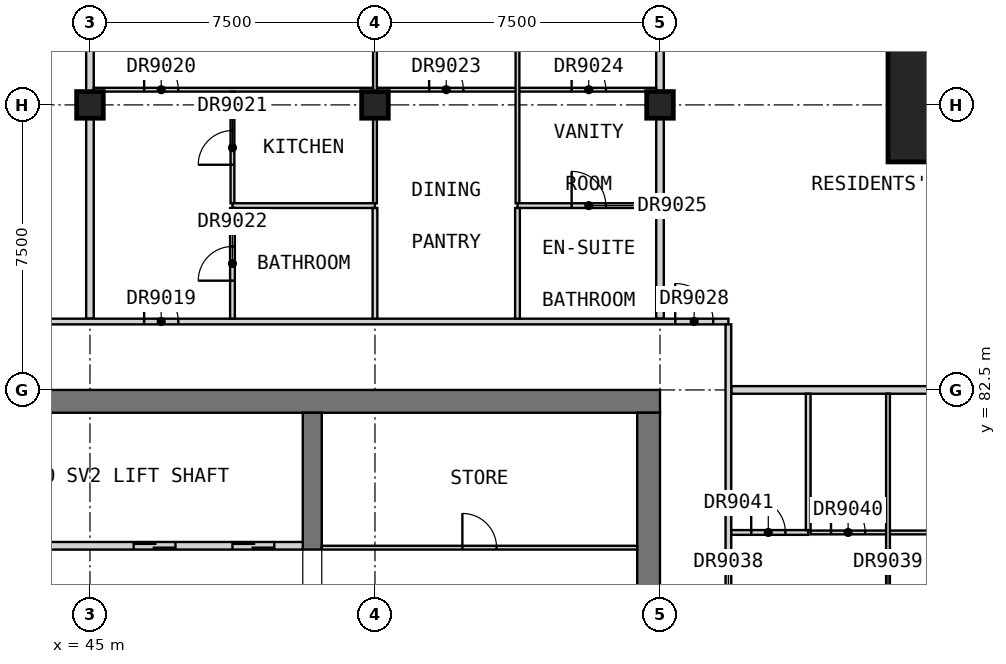
"""IFC4 building model, lengths in metres.
Left out: names, types, materials, properties, quantities, classifications, styles, units other than length and angle.
Written with IfcOpenShell. Run it as: python <this file> out.ifc"""

import sys

from ifc_helpers import new_model, si_unit, direction, frame, frame_2d, origin, origin_2d, place, context, subcontext, project, spatial, rectangle, extrude, element, fill, save


model = new_model("IFC4")
c1 = context("Model", 3, precision=1e-05, world=origin(), true_north=direction((0.0, 1.0)))
c2 = subcontext(c1, "Body", "Model", "MODEL_VIEW")
j1 = project(units=[si_unit("LENGTHUNIT", "METRE"), si_unit("PLANEANGLEUNIT", "RADIAN")], contexts=[c1])
p1 = place(None, origin())
s1 = spatial("IfcSite", under=j1, at=p1, CompositionType="ELEMENT")
p2 = place(p1, origin())
s2 = spatial("IfcBuilding", under=s1, at=p2, CompositionType="ELEMENT")
p3 = place(p2, frame((0.0, 0.0, 269.7)))
s3 = spatial("IfcBuildingStorey", under=s2, at=p3, CompositionType="ELEMENT", Elevation=269.7)
for number, where, z_axis, x_axis in (
    (1, (45.0, 90.0, 0.0), (0.0, 0.0, 1.0), (1.0, 0.0, 0.0)),
    (2, (52.5, 90.0, 0.0), (0.0, 0.0, 1.0), (1.0, 0.0, 0.0)),
    (3, (60.0, 90.0, 0.0), (0.0, 0.0, 1.0), (1.0, 0.0, 0.0)),
):
    element("IfcColumn", number, at=place(p3, frame(where, z_axis=z_axis, x_axis=x_axis)), inside=s3, PredefinedType="COLUMN", context=c2, shape_type="SweptSolid", body=[
        extrude(rectangle(XDim=0.7, YDim=0.7, at=origin_2d()), origin(), (0.0, 0.0, 1.0), 3.5),
    ])
p4 = place(p3, frame((67.5, 90.0, 0.0), z_axis=(0.0, 0.0, 1.0), x_axis=(1.0, 0.0, 0.0)))
e4 = element("IfcColumn", 4, at=p4, inside=s3, PredefinedType="COLUMN", context=c2, shape_type="SweptSolid", body=[
    extrude(rectangle(XDim=3.0, YDim=3.0, at=origin_2d()), origin(), (0.0, 0.0, 1.0), 3.5),
])
p5 = place(p3, frame((30.0, 82.2, 0.0), z_axis=(0.0, 0.0, 1.0), x_axis=(1.0, 0.0, 0.0)))
e5 = element("IfcWall", 5, at=p5, inside=s3, PredefinedType="SHEAR", context=c2, shape_type="SweptSolid", body=[
    extrude(rectangle(XDim=30.0, YDim=0.6, at=frame_2d((15.0, 0.0))), origin(), (0.0, 0.0, 1.0), 3.5),
])
p6 = place(p3, frame((59.7, 60.6, 0.0), z_axis=(0.0, 0.0, 1.0), x_axis=(0.0, 1.0, 0.0)))
e6 = element("IfcWall", 6, at=p6, inside=s3, PredefinedType="SHEAR", context=c2, shape_type="SweptSolid", body=[
    extrude(rectangle(XDim=21.3, YDim=0.6, at=frame_2d((10.65, 0.0))), origin(), (0.0, 0.0, 1.0), 3.5),
])
p7 = place(p6, frame((14.9, 0.0, 0.0)))
e7 = element("IfcOpeningElement", 7, at=p7, cuts=e6, PredefinedType="OPENING", context=c2, shape_type="SweptSolid", body=[
    extrude(rectangle(XDim=1.8, YDim=2.1, at=frame_2d((0.9, 1.05))), frame((0.0, 0.31, 0.0), z_axis=(0.0, -1.0, 0.0), x_axis=(1.0, 0.0, 0.0)), (0.0, 0.0, 1.0), 0.62),
])
p8 = place(p3, frame((50.85, 78.3, 0.0), z_axis=(0.0, 0.0, 1.0), x_axis=(0.0, 1.0, 0.0)))
e8 = element("IfcWall", 8, at=p8, inside=s3, PredefinedType="SHEAR", context=c2, shape_type="SweptSolid", body=[
    extrude(rectangle(XDim=3.6, YDim=0.5, at=frame_2d((1.8, 0.0))), origin(), (0.0, 0.0, 1.0), 3.5),
])
p9 = place(p3, frame((35.0, 78.4, 0.0), z_axis=(0.0, 0.0, 1.0), x_axis=(1.0, 0.0, 0.0)))
e9 = element("IfcWall", 9, at=p9, inside=s3, PredefinedType="SOLIDWALL", context=c2, shape_type="SweptSolid", body=[
    extrude(rectangle(XDim=15.6, YDim=0.2, at=frame_2d((7.8, 0.0))), origin(), (0.0, 0.0, 1.0), 3.5),
])
p10 = place(p9, frame((0.75, 0.0, 0.0)))
e10 = element("IfcOpeningElement", 10, at=p10, cuts=e9, PredefinedType="OPENING", context=c2, shape_type="SweptSolid", body=[
    extrude(rectangle(XDim=1.1, YDim=2.1, at=frame_2d((0.55, 1.05))), frame((0.0, 0.11, 0.0), z_axis=(0.0, -1.0, 0.0), x_axis=(1.0, 0.0, 0.0)), (0.0, 0.0, 1.0), 0.22),
])
p11 = place(p9, frame((3.35, 0.0, 0.0)))
e11 = element("IfcOpeningElement", 11, at=p11, cuts=e9, PredefinedType="OPENING", context=c2, shape_type="SweptSolid", body=[
    extrude(rectangle(XDim=1.1, YDim=2.1, at=frame_2d((0.55, 1.05))), frame((0.0, 0.11, 0.0), z_axis=(0.0, -1.0, 0.0), x_axis=(1.0, 0.0, 0.0)), (0.0, 0.0, 1.0), 0.22),
])
p12 = place(p9, frame((11.15, 0.0, 0.0)))
e12 = element("IfcOpeningElement", 12, at=p12, cuts=e9, PredefinedType="OPENING", context=c2, shape_type="SweptSolid", body=[
    extrude(rectangle(XDim=1.1, YDim=2.1, at=frame_2d((0.55, 1.05))), frame((0.0, 0.11, 0.0), z_axis=(0.0, -1.0, 0.0), x_axis=(1.0, 0.0, 0.0)), (0.0, 0.0, 1.0), 0.22),
])
p13 = place(p9, frame((13.75, 0.0, 0.0)))
e13 = element("IfcOpeningElement", 13, at=p13, cuts=e9, PredefinedType="OPENING", context=c2, shape_type="SweptSolid", body=[
    extrude(rectangle(XDim=1.1, YDim=2.1, at=frame_2d((0.55, 1.05))), frame((0.0, 0.11, 0.0), z_axis=(0.0, -1.0, 0.0), x_axis=(1.0, 0.0, 0.0)), (0.0, 0.0, 1.0), 0.22),
])
p14 = place(p3, frame((51.1, 78.35, 0.0), z_axis=(0.0, 0.0, 1.0), x_axis=(1.0, 0.0, 0.0)))
e14 = element("IfcWall", 14, at=p14, inside=s3, PredefinedType="PARTITIONING", context=c2, shape_type="SweptSolid", body=[
    extrude(rectangle(XDim=8.3, YDim=0.1, at=frame_2d((4.15, 0.0))), origin(), (0.0, 0.0, 1.0), 3.25),
])
p15 = place(p14, frame((3.7, 0.0, 0.0)))
e15 = element("IfcOpeningElement", 15, at=p15, cuts=e14, PredefinedType="OPENING", context=c2, shape_type="SweptSolid", body=[
    extrude(rectangle(XDim=0.9, YDim=2.1, at=frame_2d((0.45, 1.05))), frame((0.0, 0.06, 0.0), z_axis=(0.0, -1.0, 0.0), x_axis=(1.0, 0.0, 0.0)), (0.0, 0.0, 1.0), 0.12),
])
for number, where, z_axis, x_axis in (
    (16, (61.875, 82.5, 0.0), (0.0, 0.0, 1.0), (1.0, 0.0, 0.0)),
    (17, (45.0, 84.375, 0.0), (0.0, 0.0, 1.0), (0.0, 1.0, 0.0)),
    (18, (60.0, 84.375, 0.0), (0.0, 0.0, 1.0), (0.0, 1.0, 0.0)),
):
    element("IfcWall", number, at=place(p3, frame(where, z_axis=z_axis, x_axis=x_axis)), inside=s3, PredefinedType="PARTITIONING", context=c2, shape_type="SweptSolid", body=[
        extrude(rectangle(XDim=13.125, YDim=0.2, at=frame_2d((6.562, 0.0))), origin(), (0.0, 0.0, 1.0), 3.25),
    ])
p16 = place(p3, frame((33.75, 84.3, 0.0), z_axis=(0.0, 0.0, 1.0), x_axis=(1.0, 0.0, 0.0)))
e19 = element("IfcWall", 19, at=p16, inside=s3, PredefinedType="PARTITIONING", context=c2, shape_type="SweptSolid", body=[
    extrude(rectangle(XDim=28.05, YDim=0.15, at=frame_2d((14.025, 0.0))), origin(), (0.0, 0.0, 1.0), 3.25),
])
p17 = place(p16, frame((5.125, 0.0, 0.0)))
e20 = element("IfcOpeningElement", 20, at=p17, cuts=e19, PredefinedType="OPENING", context=c2, shape_type="SweptSolid", body=[
    extrude(rectangle(XDim=1.0, YDim=2.1, at=frame_2d((0.5, 1.05))), frame((0.0, 0.085, 0.0), z_axis=(0.0, -1.0, 0.0), x_axis=(1.0, 0.0, 0.0)), (0.0, 0.0, 1.0), 0.17),
])
p18 = place(p16, frame((12.675, 0.0, 0.0)))
e21 = element("IfcOpeningElement", 21, at=p18, cuts=e19, PredefinedType="OPENING", context=c2, shape_type="SweptSolid", body=[
    extrude(rectangle(XDim=0.9, YDim=2.1, at=frame_2d((0.45, 1.05))), frame((0.0, 0.085, 0.0), z_axis=(0.0, -1.0, 0.0), x_axis=(1.0, 0.0, 0.0)), (0.0, 0.0, 1.0), 0.17),
])
p19 = place(p16, frame((26.65, 0.0, 0.0)))
e22 = element("IfcOpeningElement", 22, at=p19, cuts=e19, PredefinedType="OPENING", context=c2, shape_type="SweptSolid", body=[
    extrude(rectangle(XDim=1.0, YDim=2.1, at=frame_2d((0.5, 1.05))), frame((0.0, 0.085, 0.0), z_axis=(0.0, -1.0, 0.0), x_axis=(1.0, 0.0, 0.0)), (0.0, 0.0, 1.0), 0.17),
])
p20 = place(p3, frame((61.8, 58.275, 0.0), z_axis=(0.0, 0.0, 1.0), x_axis=(0.0, 1.0, 0.0)))
e23 = element("IfcWall", 23, at=p20, inside=s3, PredefinedType="PARTITIONING", context=c2, shape_type="SweptSolid", body=[
    extrude(rectangle(XDim=25.95, YDim=0.15, at=frame_2d((12.975, 0.0))), origin(), (0.0, 0.0, 1.0), 3.25),
])
p21 = place(p20, frame((3.15, 0.0, 0.0)))
e24 = element("IfcOpeningElement", 24, at=p21, cuts=e23, PredefinedType="OPENING", context=c2, shape_type="SweptSolid", body=[
    extrude(rectangle(XDim=0.9, YDim=2.1, at=frame_2d((0.45, 1.05))), frame((0.0, 0.085, 0.0), z_axis=(0.0, -1.0, 0.0), x_axis=(1.0, 0.0, 0.0)), (0.0, 0.0, 1.0), 0.17),
])
p22 = place(p20, frame((18.15, 0.0, 0.0)))
e25 = element("IfcOpeningElement", 25, at=p22, cuts=e23, PredefinedType="OPENING", context=c2, shape_type="SweptSolid", body=[
    extrude(rectangle(XDim=0.9, YDim=2.1, at=frame_2d((0.45, 1.05))), frame((0.0, 0.085, 0.0), z_axis=(0.0, -1.0, 0.0), x_axis=(1.0, 0.0, 0.0)), (0.0, 0.0, 1.0), 0.17),
])
p23 = place(p3, frame((63.962, 78.75, 0.0), z_axis=(0.0, 0.0, 1.0), x_axis=(1.0, 0.0, 0.0)))
e26 = element("IfcWall", 26, at=p23, inside=s3, PredefinedType="PARTITIONING", context=c2, shape_type="SweptSolid", body=[
    extrude(rectangle(XDim=10.228, YDim=0.1, at=frame_2d((5.114, 0.0))), origin(), (0.0, 0.0, 1.0), 3.25),
])
p24 = place(p23, frame((0.538, 0.0, 0.0)))
e27 = element("IfcOpeningElement", 27, at=p24, cuts=e26, PredefinedType="OPENING", context=c2, shape_type="SweptSolid", body=[
    extrude(rectangle(XDim=0.9, YDim=2.1, at=frame_2d((0.45, 1.05))), frame((0.0, 0.06, 0.0), z_axis=(0.0, -1.0, 0.0), x_axis=(1.0, 0.0, 0.0)), (0.0, 0.0, 1.0), 0.12),
])
p25 = place(p23, frame((6.087, 0.0, 0.0)))
e28 = element("IfcOpeningElement", 28, at=p25, cuts=e26, PredefinedType="OPENING", context=c2, shape_type="SweptSolid", body=[
    extrude(rectangle(XDim=0.9, YDim=2.1, at=frame_2d((0.45, 1.05))), frame((0.0, 0.06, 0.0), z_axis=(0.0, -1.0, 0.0), x_axis=(1.0, 0.0, 0.0)), (0.0, 0.0, 1.0), 0.12),
])
p26 = place(p3, frame((45.1, 90.4, 0.0), z_axis=(0.0, 0.0, 1.0), x_axis=(1.0, 0.0, 0.0)))
e29 = element("IfcWall", 29, at=p26, inside=s3, PredefinedType="PARTITIONING", context=c2, shape_type="SweptSolid", body=[
    extrude(rectangle(XDim=14.8, YDim=0.1, at=frame_2d((7.4, 0.0))), origin(), (0.0, 0.0, 1.0), 3.25),
])
p27 = place(p26, frame((1.325, 0.0, 0.0)))
e30 = element("IfcOpeningElement", 30, at=p27, cuts=e29, PredefinedType="OPENING", context=c2, shape_type="SweptSolid", body=[
    extrude(rectangle(XDim=0.9, YDim=2.1, at=frame_2d((0.45, 1.05))), frame((0.0, 0.06, 0.0), z_axis=(0.0, -1.0, 0.0), x_axis=(1.0, 0.0, 0.0)), (0.0, 0.0, 1.0), 0.12),
])
p28 = place(p26, frame((8.825, 0.0, 0.0)))
e31 = element("IfcOpeningElement", 31, at=p28, cuts=e29, PredefinedType="OPENING", context=c2, shape_type="SweptSolid", body=[
    extrude(rectangle(XDim=0.9, YDim=2.1, at=frame_2d((0.45, 1.05))), frame((0.0, 0.06, 0.0), z_axis=(0.0, -1.0, 0.0), x_axis=(1.0, 0.0, 0.0)), (0.0, 0.0, 1.0), 0.12),
])
p29 = place(p26, frame((12.575, 0.0, 0.0)))
e32 = element("IfcOpeningElement", 32, at=p29, cuts=e29, PredefinedType="OPENING", context=c2, shape_type="SweptSolid", body=[
    extrude(rectangle(XDim=0.9, YDim=2.1, at=frame_2d((0.45, 1.05))), frame((0.0, 0.06, 0.0), z_axis=(0.0, -1.0, 0.0), x_axis=(1.0, 0.0, 0.0)), (0.0, 0.0, 1.0), 0.12),
])
p30 = place(p3, frame((48.75, 87.413, 0.0), z_axis=(0.0, 0.0, 1.0), x_axis=(0.0, 1.0, 0.0)))
e33 = element("IfcWall", 33, at=p30, inside=s3, PredefinedType="PARTITIONING", context=c2, shape_type="SweptSolid", body=[
    extrude(rectangle(XDim=2.938, YDim=0.1, at=frame_2d((1.469, 0.0))), origin(), (0.0, 0.0, 1.0), 3.25),
])
p31 = place(p30, frame((1.012, 0.0, 0.0)))
e34 = element("IfcOpeningElement", 34, at=p31, cuts=e33, PredefinedType="OPENING", context=c2, shape_type="SweptSolid", body=[
    extrude(rectangle(XDim=0.9, YDim=2.1, at=frame_2d((0.45, 1.05))), frame((0.0, 0.06, 0.0), z_axis=(0.0, -1.0, 0.0), x_axis=(1.0, 0.0, 0.0)), (0.0, 0.0, 1.0), 0.12),
])
p32 = place(p3, frame((52.5, 87.413, 0.0), z_axis=(0.0, 0.0, 1.0), x_axis=(0.0, 1.0, 0.0)))
e35 = element("IfcWall", 35, at=p32, inside=s3, PredefinedType="PARTITIONING", context=c2, shape_type="SweptSolid", body=[
    extrude(rectangle(XDim=10.087, YDim=0.1, at=frame_2d((5.044, 0.0))), origin(), (0.0, 0.0, 1.0), 3.25),
])
p33 = place(p32, frame((6.087, 0.0, 0.0)))
e36 = element("IfcOpeningElement", 36, at=p33, cuts=e35, PredefinedType="OPENING", context=c2, shape_type="SweptSolid", body=[
    extrude(rectangle(XDim=0.9, YDim=2.1, at=frame_2d((0.45, 1.05))), frame((0.0, 0.06, 0.0), z_axis=(0.0, -1.0, 0.0), x_axis=(1.0, 0.0, 0.0)), (0.0, 0.0, 1.0), 0.12),
])
p34 = place(p3, frame((56.25, 87.413, 0.0), z_axis=(0.0, 0.0, 1.0), x_axis=(0.0, 1.0, 0.0)))
e37 = element("IfcWall", 37, at=p34, inside=s3, PredefinedType="PARTITIONING", context=c2, shape_type="SweptSolid", body=[
    extrude(rectangle(XDim=9.277, YDim=0.1, at=frame_2d((4.639, 0.0))), origin(), (0.0, 0.0, 1.0), 3.25),
])
p35 = place(p34, frame((6.087, 0.0, 0.0)))
e38 = element("IfcOpeningElement", 38, at=p35, cuts=e37, PredefinedType="OPENING", context=c2, shape_type="SweptSolid", body=[
    extrude(rectangle(XDim=0.9, YDim=2.1, at=frame_2d((0.45, 1.05))), frame((0.0, 0.06, 0.0), z_axis=(0.0, -1.0, 0.0), x_axis=(1.0, 0.0, 0.0)), (0.0, 0.0, 1.0), 0.12),
])
p36 = place(p3, frame((66.0, 60.1, 0.0), z_axis=(0.0, 0.0, 1.0), x_axis=(0.0, 1.0, 0.0)))
e39 = element("IfcWall", 39, at=p36, inside=s3, PredefinedType="PARTITIONING", context=c2, shape_type="SweptSolid", body=[
    extrude(rectangle(XDim=22.3, YDim=0.1, at=frame_2d((11.15, 0.0))), origin(), (0.0, 0.0, 1.0), 3.25),
])
p37 = place(p36, frame((1.325, 0.0, 0.0)))
e40 = element("IfcOpeningElement", 40, at=p37, cuts=e39, PredefinedType="OPENING", context=c2, shape_type="SweptSolid", body=[
    extrude(rectangle(XDim=0.9, YDim=2.1, at=frame_2d((0.45, 1.05))), frame((0.0, 0.06, 0.0), z_axis=(0.0, -1.0, 0.0), x_axis=(1.0, 0.0, 0.0)), (0.0, 0.0, 1.0), 0.12),
])
p38 = place(p36, frame((8.825, 0.0, 0.0)))
e41 = element("IfcOpeningElement", 41, at=p38, cuts=e39, PredefinedType="OPENING", context=c2, shape_type="SweptSolid", body=[
    extrude(rectangle(XDim=0.9, YDim=2.1, at=frame_2d((0.45, 1.05))), frame((0.0, 0.06, 0.0), z_axis=(0.0, -1.0, 0.0), x_axis=(1.0, 0.0, 0.0)), (0.0, 0.0, 1.0), 0.12),
])
p39 = place(p36, frame((12.575, 0.0, 0.0)))
e42 = element("IfcOpeningElement", 42, at=p39, cuts=e39, PredefinedType="OPENING", context=c2, shape_type="SweptSolid", body=[
    extrude(rectangle(XDim=0.9, YDim=2.1, at=frame_2d((0.45, 1.05))), frame((0.0, 0.06, 0.0), z_axis=(0.0, -1.0, 0.0), x_axis=(1.0, 0.0, 0.0)), (0.0, 0.0, 1.0), 0.12),
])
p40 = place(p36, frame((16.325, 0.0, 0.0)))
e43 = element("IfcOpeningElement", 43, at=p40, cuts=e39, PredefinedType="OPENING", context=c2, shape_type="SweptSolid", body=[
    extrude(rectangle(XDim=0.9, YDim=2.1, at=frame_2d((0.45, 1.05))), frame((0.0, 0.06, 0.0), z_axis=(0.0, -1.0, 0.0), x_axis=(1.0, 0.0, 0.0)), (0.0, 0.0, 1.0), 0.12),
])
p41 = place(p3, frame((61.875, 78.75, 0.0), z_axis=(0.0, 0.0, 1.0), x_axis=(1.0, 0.0, 0.0)))
e44 = element("IfcWall", 44, at=p41, inside=s3, PredefinedType="PARTITIONING", context=c2, shape_type="SweptSolid", body=[
    extrude(rectangle(XDim=2.025, YDim=0.125, at=frame_2d((1.012, 0.0))), origin(), (0.0, 0.0, 1.0), 3.25),
])
p42 = place(p41, frame((0.525, 0.0, 0.0)))
e45 = element("IfcOpeningElement", 45, at=p42, cuts=e44, PredefinedType="OPENING", context=c2, shape_type="SweptSolid", body=[
    extrude(rectangle(XDim=0.9, YDim=2.1, at=frame_2d((0.45, 1.05))), frame((0.0, 0.073, 0.0), z_axis=(0.0, -1.0, 0.0), x_axis=(1.0, 0.0, 0.0)), (0.0, 0.0, 1.0), 0.145),
])
p43 = place(p3, frame((48.75, 87.35, 0.0), z_axis=(0.0, 0.0, 1.0), x_axis=(1.0, 0.0, 0.0)))
e46 = element("IfcWall", 46, at=p43, inside=s3, PredefinedType="PARTITIONING", context=c2, shape_type="SweptSolid", body=[
    extrude(rectangle(XDim=3.75, YDim=0.125, at=frame_2d((1.875, 0.0))), origin(), (0.0, 0.0, 1.0), 3.25),
])
p44 = place(p3, frame((56.25, 87.35, 0.0), z_axis=(0.0, 0.0, 1.0), x_axis=(1.0, 0.0, 0.0)))
e47 = element("IfcWall", 47, at=p44, inside=s3, PredefinedType="PARTITIONING", context=c2, shape_type="SweptSolid", body=[
    extrude(rectangle(XDim=3.65, YDim=0.125, at=frame_2d((1.825, 0.0))), origin(), (0.0, 0.0, 1.0), 3.25),
])
p45 = place(p44, frame((1.425, 0.0, 0.0)))
e48 = element("IfcOpeningElement", 48, at=p45, cuts=e47, PredefinedType="OPENING", context=c2, shape_type="SweptSolid", body=[
    extrude(rectangle(XDim=0.9, YDim=2.1, at=frame_2d((0.45, 1.05))), frame((0.0, 0.073, 0.0), z_axis=(0.0, -1.0, 0.0), x_axis=(1.0, 0.0, 0.0)), (0.0, 0.0, 1.0), 0.145),
])
p46 = place(p3, frame((48.75, 84.375, 0.0), z_axis=(0.0, 0.0, 1.0), x_axis=(0.0, 1.0, 0.0)))
e49 = element("IfcWall", 49, at=p46, inside=s3, PredefinedType="PARTITIONING", context=c2, shape_type="SweptSolid", body=[
    extrude(rectangle(XDim=2.913, YDim=0.125, at=frame_2d((1.456, 0.0))), origin(), (0.0, 0.0, 1.0), 3.25),
])
p47 = place(p46, frame((1.0, 0.0, 0.0)))
e50 = element("IfcOpeningElement", 50, at=p47, cuts=e49, PredefinedType="OPENING", context=c2, shape_type="SweptSolid", body=[
    extrude(rectangle(XDim=0.9, YDim=2.1, at=frame_2d((0.45, 1.05))), frame((0.0, 0.073, 0.0), z_axis=(0.0, -1.0, 0.0), x_axis=(1.0, 0.0, 0.0)), (0.0, 0.0, 1.0), 0.145),
])
for number, where, z_axis, x_axis in (
    (51, (52.5, 84.375, 0.0), (0.0, 0.0, 1.0), (0.0, 1.0, 0.0)),
    (52, (56.25, 84.375, 0.0), (0.0, 0.0, 1.0), (0.0, 1.0, 0.0)),
):
    element("IfcWall", number, at=place(p3, frame(where, z_axis=z_axis, x_axis=x_axis)), inside=s3, PredefinedType="PARTITIONING", context=c2, shape_type="SweptSolid", body=[
        extrude(rectangle(XDim=2.913, YDim=0.125, at=frame_2d((1.456, 0.0))), origin(), (0.0, 0.0, 1.0), 3.25),
    ])
p48 = place(p3, frame((63.9, 78.812, 0.0), z_axis=(0.0, 0.0, 1.0), x_axis=(0.0, 1.0, 0.0)))
e53 = element("IfcWall", 53, at=p48, inside=s3, PredefinedType="PARTITIONING", context=c2, shape_type="SweptSolid", body=[
    extrude(rectangle(XDim=3.587, YDim=0.125, at=frame_2d((1.794, 0.0))), origin(), (0.0, 0.0, 1.0), 3.25),
])
p49 = place(p12, origin())
e54 = element("IfcDoor", 54, at=p49, inside=s3, OperationType="DOUBLE_DOOR_SLIDING", PredefinedType="DOOR", context=c2, shape_type="SweptSolid", body=[
    extrude(rectangle(XDim=1.1, YDim=2.1, at=frame_2d((0.55, 1.05))), frame((0.0, 0.025, 0.0), z_axis=(0.0, -1.0, 0.0), x_axis=(1.0, 0.0, 0.0)), (0.0, 0.0, 1.0), 0.05),
])
fill(e12, e54)
p50 = place(p13, origin())
e55 = element("IfcDoor", 55, at=p50, inside=s3, OperationType="DOUBLE_DOOR_SLIDING", PredefinedType="DOOR", context=c2, shape_type="SweptSolid", body=[
    extrude(rectangle(XDim=1.1, YDim=2.1, at=frame_2d((0.55, 1.05))), frame((0.0, 0.025, 0.0), z_axis=(0.0, -1.0, 0.0), x_axis=(1.0, 0.0, 0.0)), (0.0, 0.0, 1.0), 0.05),
])
fill(e13, e55)
p51 = place(p15, origin())
e56 = element("IfcDoor", 56, at=p51, inside=s3, OperationType="SINGLE_SWING_LEFT", PredefinedType="DOOR", context=c2, shape_type="SweptSolid", body=[
    extrude(rectangle(XDim=0.9, YDim=2.1, at=frame_2d((0.45, 1.05))), frame((0.0, 0.025, 0.0), z_axis=(0.0, -1.0, 0.0), x_axis=(1.0, 0.0, 0.0)), (0.0, 0.0, 1.0), 0.05),
])
fill(e15, e56)
p52 = place(p18, origin())
e57 = element("IfcDoor", 57, at=p52, inside=s3, OperationType="SINGLE_SWING_LEFT", PredefinedType="DOOR", context=c2, shape_type="SweptSolid", body=[
    extrude(rectangle(XDim=0.9, YDim=2.1, at=frame_2d((0.45, 1.05))), frame((0.0, 0.025, 0.0), z_axis=(0.0, -1.0, 0.0), x_axis=(1.0, 0.0, 0.0)), (0.0, 0.0, 1.0), 0.05),
])
fill(e21, e57)
p53 = place(p27, origin())
e58 = element("IfcDoor", 58, at=p53, inside=s3, OperationType="SINGLE_SWING_RIGHT", PredefinedType="DOOR", context=c2, shape_type="SweptSolid", body=[
    extrude(rectangle(XDim=0.9, YDim=2.1, at=frame_2d((0.45, 1.05))), frame((0.0, 0.025, 0.0), z_axis=(0.0, -1.0, 0.0), x_axis=(1.0, 0.0, 0.0)), (0.0, 0.0, 1.0), 0.05),
])
fill(e30, e58)
p54 = place(p31, origin())
e59 = element("IfcDoor", 59, at=p54, inside=s3, OperationType="SINGLE_SWING_RIGHT", PredefinedType="DOOR", context=c2, shape_type="SweptSolid", body=[
    extrude(rectangle(XDim=0.9, YDim=2.1, at=frame_2d((0.45, 1.05))), frame((0.0, 0.025, 0.0), z_axis=(0.0, -1.0, 0.0), x_axis=(1.0, 0.0, 0.0)), (0.0, 0.0, 1.0), 0.05),
])
fill(e34, e59)
p55 = place(p47, origin())
e60 = element("IfcDoor", 60, at=p55, inside=s3, OperationType="SINGLE_SWING_LEFT", PredefinedType="DOOR", context=c2, shape_type="SweptSolid", body=[
    extrude(rectangle(XDim=0.9, YDim=2.1, at=frame_2d((0.45, 1.05))), frame((0.0, 0.025, 0.0), z_axis=(0.0, -1.0, 0.0), x_axis=(1.0, 0.0, 0.0)), (0.0, 0.0, 1.0), 0.05),
])
fill(e50, e60)
p56 = place(p28, origin())
e61 = element("IfcDoor", 61, at=p56, inside=s3, OperationType="SINGLE_SWING_RIGHT", PredefinedType="DOOR", context=c2, shape_type="SweptSolid", body=[
    extrude(rectangle(XDim=0.9, YDim=2.1, at=frame_2d((0.45, 1.05))), frame((0.0, 0.025, 0.0), z_axis=(0.0, -1.0, 0.0), x_axis=(1.0, 0.0, 0.0)), (0.0, 0.0, 1.0), 0.05),
])
fill(e31, e61)
p57 = place(p29, origin())
e62 = element("IfcDoor", 62, at=p57, inside=s3, OperationType="SINGLE_SWING_RIGHT", PredefinedType="DOOR", context=c2, shape_type="SweptSolid", body=[
    extrude(rectangle(XDim=0.9, YDim=2.1, at=frame_2d((0.45, 1.05))), frame((0.0, 0.025, 0.0), z_axis=(0.0, -1.0, 0.0), x_axis=(1.0, 0.0, 0.0)), (0.0, 0.0, 1.0), 0.05),
])
fill(e32, e62)
p58 = place(p45, origin())
e63 = element("IfcDoor", 63, at=p58, inside=s3, OperationType="SINGLE_SWING_RIGHT", PredefinedType="DOOR", context=c2, shape_type="SweptSolid", body=[
    extrude(rectangle(XDim=0.9, YDim=2.1, at=frame_2d((0.45, 1.05))), frame((0.0, 0.025, 0.0), z_axis=(0.0, -1.0, 0.0), x_axis=(1.0, 0.0, 0.0)), (0.0, 0.0, 1.0), 0.05),
])
fill(e48, e63)
p59 = place(p19, origin())
e64 = element("IfcDoor", 64, at=p59, inside=s3, OperationType="SINGLE_SWING_LEFT", PredefinedType="DOOR", context=c2, shape_type="SweptSolid", body=[
    extrude(rectangle(XDim=1.0, YDim=2.1, at=frame_2d((0.5, 1.05))), frame((0.0, 0.025, 0.0), z_axis=(0.0, -1.0, 0.0), x_axis=(1.0, 0.0, 0.0)), (0.0, 0.0, 1.0), 0.05),
])
fill(e22, e64)
p60 = place(p24, origin())
e65 = element("IfcDoor", 65, at=p60, inside=s3, OperationType="SINGLE_SWING_RIGHT", PredefinedType="DOOR", context=c2, shape_type="SweptSolid", body=[
    extrude(rectangle(XDim=0.9, YDim=2.1, at=frame_2d((0.45, 1.05))), frame((0.0, 0.025, 0.0), z_axis=(0.0, -1.0, 0.0), x_axis=(1.0, 0.0, 0.0)), (0.0, 0.0, 1.0), 0.05),
])
fill(e27, e65)
p61 = place(p42, origin())
e66 = element("IfcDoor", 66, at=p61, inside=s3, OperationType="SINGLE_SWING_RIGHT", PredefinedType="DOOR", context=c2, shape_type="SweptSolid", body=[
    extrude(rectangle(XDim=0.9, YDim=2.1, at=frame_2d((0.45, 1.05))), frame((0.0, 0.025, 0.0), z_axis=(0.0, -1.0, 0.0), x_axis=(1.0, 0.0, 0.0)), (0.0, 0.0, 1.0), 0.05),
])
fill(e45, e66)
save(model, sys.argv[1])
